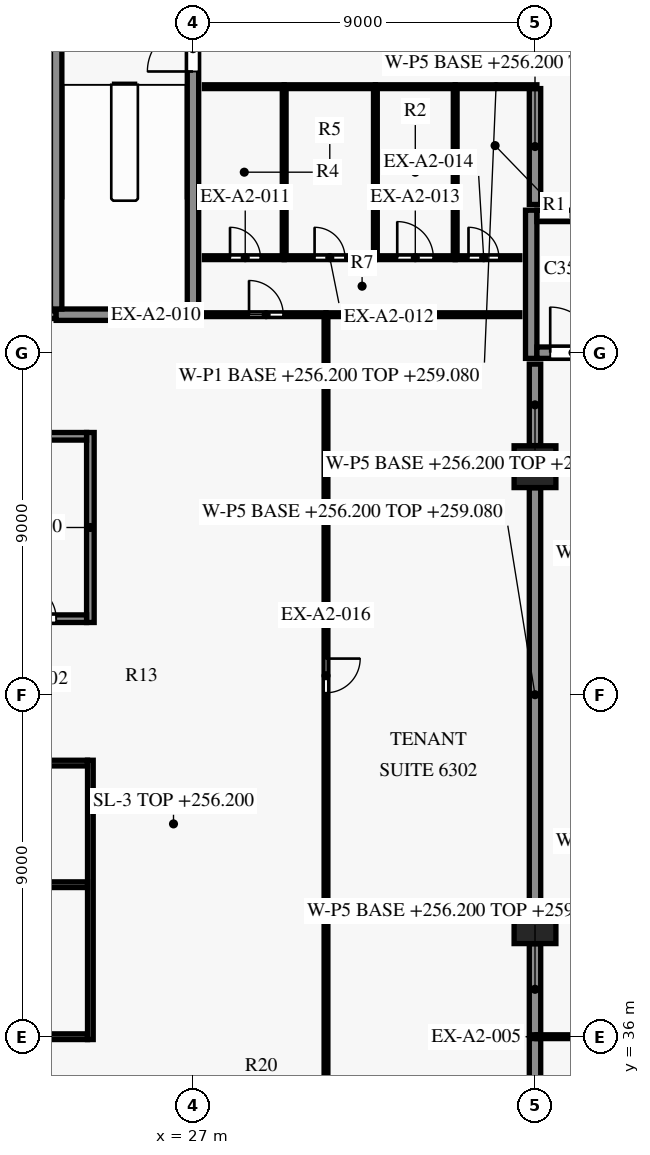
"""IFC4 building model, lengths in metres.
Left out: names, types, materials, properties, quantities, classifications, styles, units other than length and angle.
Written with IfcOpenShell. Run it as: python <this file> out.ifc"""

import sys

from ifc_helpers import new_model, si_unit, direction, frame, frame_2d, origin, origin_2d, place, context, subcontext, project, spatial, rectangle, extrude, element, fill, save


model = new_model("IFC4")
c1 = context("Model", 3, precision=1e-05, world=origin(), true_north=direction((0.0, 1.0)))
c2 = subcontext(c1, "Body", "Model", "MODEL_VIEW")
j1 = project(units=[si_unit("LENGTHUNIT", "METRE"), si_unit("PLANEANGLEUNIT", "RADIAN")], contexts=[c1])
p1 = place(None, origin())
s1 = spatial("IfcSite", under=j1, at=p1, CompositionType="ELEMENT")
p2 = place(p1, origin())
s2 = spatial("IfcBuilding", under=s1, at=p2, CompositionType="ELEMENT")
p3 = place(p2, frame((0.0, 0.0, 256.2)))
s3 = spatial("IfcBuildingStorey", under=s2, at=p3, CompositionType="ELEMENT", Elevation=256.2)
for number, where, z_axis, x_axis in (
    (1, (36.0, 39.0, 0.0), (0.0, 0.0, 1.0), (1.0, 0.0, 0.0)),
    (2, (36.0, 51.0, 0.0), (0.0, 0.0, 1.0), (1.0, 0.0, 0.0)),
):
    element("IfcColumn", number, at=place(p3, frame(where, z_axis=z_axis, x_axis=x_axis)), inside=s3, PredefinedType="COLUMN", context=c2, shape_type="SweptSolid", body=[
        extrude(rectangle(XDim=1.1, YDim=1.1, at=origin_2d()), origin(), (0.0, 0.0, 1.0), 3.8),
    ])
p4 = place(p3, frame((12.4, 36.0, 0.0), z_axis=(0.0, 0.0, 1.0), x_axis=(1.0, 0.0, 0.0)))
e3 = element("IfcWall", 3, at=p4, inside=s3, PredefinedType="SHEAR", context=c2, shape_type="SweptSolid", body=[
    extrude(rectangle(XDim=11.825, YDim=0.15, at=frame_2d((5.913, 0.0))), origin(), (0.0, 0.0, 1.0), 3.5),
])
p5 = place(p4, frame((0.95, 0.0, 0.0)))
e4 = element("IfcOpeningElement", 4, at=p5, cuts=e3, PredefinedType="OPENING", context=c2, shape_type="SweptSolid", body=[
    extrude(rectangle(XDim=0.9, YDim=2.1, at=frame_2d((0.45, 1.05))), frame((0.0, 0.085, 0.0), z_axis=(0.0, -1.0, 0.0), x_axis=(1.0, 0.0, 0.0)), (0.0, 0.0, 1.0), 0.17),
])
p6 = place(p4, frame((3.75, 0.0, 0.0)))
e5 = element("IfcOpeningElement", 5, at=p6, cuts=e3, PredefinedType="OPENING", context=c2, shape_type="SweptSolid", body=[
    extrude(rectangle(XDim=0.9, YDim=2.1, at=frame_2d((0.45, 1.05))), frame((0.0, 0.085, 0.0), z_axis=(0.0, -1.0, 0.0), x_axis=(1.0, 0.0, 0.0)), (0.0, 0.0, 1.0), 0.17),
])
p7 = place(p4, frame((6.325, 0.0, 0.0)))
e6 = element("IfcOpeningElement", 6, at=p7, cuts=e3, PredefinedType="OPENING", context=c2, shape_type="SweptSolid", body=[
    extrude(rectangle(XDim=0.95, YDim=2.1, at=frame_2d((0.475, 1.05))), frame((0.0, 0.085, 0.0), z_axis=(0.0, -1.0, 0.0), x_axis=(1.0, 0.0, 0.0)), (0.0, 0.0, 1.0), 0.17),
])
p8 = place(p4, frame((9.5, 0.0, 0.0)))
e7 = element("IfcOpeningElement", 7, at=p8, cuts=e3, PredefinedType="OPENING", context=c2, shape_type="SweptSolid", body=[
    extrude(rectangle(XDim=0.9, YDim=2.1, at=frame_2d((0.45, 1.05))), frame((0.0, 0.085, 0.0), z_axis=(0.0, -1.0, 0.0), x_axis=(1.0, 0.0, 0.0)), (0.0, 0.0, 1.0), 0.17),
])
p9 = place(p3, frame((8.1, 40.0, 0.0), z_axis=(0.0, 0.0, 1.0), x_axis=(1.0, 0.0, 0.0)))
e8 = element("IfcWall", 8, at=p9, inside=s3, PredefinedType="PARTITIONING", context=c2, shape_type="SweptSolid", body=[
    extrude(rectangle(XDim=16.125, YDim=0.15, at=frame_2d((8.062, 0.0))), origin(), (0.0, 0.0, 1.0), 3.5),
])
p10 = place(p3, frame((8.1, 43.2, 0.0), z_axis=(0.0, 0.0, 1.0), x_axis=(1.0, 0.0, 0.0)))
e9 = element("IfcWall", 9, at=p10, inside=s3, PredefinedType="PARTITIONING", context=c2, shape_type="SweptSolid", body=[
    extrude(rectangle(XDim=16.125, YDim=0.15, at=frame_2d((8.062, 0.0))), origin(), (0.0, 0.0, 1.0), 3.5),
])
p11 = place(p10, frame((1.925, 0.0, 0.0)))
e10 = element("IfcOpeningElement", 10, at=p11, cuts=e9, PredefinedType="OPENING", context=c2, shape_type="SweptSolid", body=[
    extrude(rectangle(XDim=0.9, YDim=2.1, at=frame_2d((0.45, 1.05))), frame((0.0, 0.085, 0.0), z_axis=(0.0, -1.0, 0.0), x_axis=(1.0, 0.0, 0.0)), (0.0, 0.0, 1.0), 0.17),
])
p12 = place(p10, frame((10.025, 0.0, 0.0)))
e11 = element("IfcOpeningElement", 11, at=p12, cuts=e9, PredefinedType="OPENING", context=c2, shape_type="SweptSolid", body=[
    extrude(rectangle(XDim=0.9, YDim=2.1, at=frame_2d((0.45, 1.05))), frame((0.0, 0.085, 0.0), z_axis=(0.0, -1.0, 0.0), x_axis=(1.0, 0.0, 0.0)), (0.0, 0.0, 1.0), 0.17),
])
p13 = place(p3, frame((21.6, 47.0, 0.0), z_axis=(0.0, 0.0, 1.0), x_axis=(1.0, 0.0, 0.0)))
e12 = element("IfcWall", 12, at=p13, inside=s3, PredefinedType="PARTITIONING", context=c2, shape_type="SweptSolid", body=[
    extrude(rectangle(XDim=2.6, YDim=0.2, at=frame_2d((1.3, 0.0))), origin(), (0.0, 0.0, 1.0), 3.5),
])
p14 = place(p13, frame((0.9, 0.0, 0.0)))
e13 = element("IfcOpeningElement", 13, at=p14, cuts=e12, PredefinedType="OPENING", context=c2, shape_type="SweptSolid", body=[
    extrude(rectangle(XDim=0.9, YDim=2.1, at=frame_2d((0.45, 1.05))), frame((0.0, 0.11, 0.0), z_axis=(0.0, -1.0, 0.0), x_axis=(1.0, 0.0, 0.0)), (0.0, 0.0, 1.0), 0.22),
])
p15 = place(p3, frame((21.6, 51.8, 0.0), z_axis=(0.0, 0.0, 1.0), x_axis=(1.0, 0.0, 0.0)))
e14 = element("IfcWall", 14, at=p15, inside=s3, PredefinedType="PARTITIONING", context=c2, shape_type="SweptSolid", body=[
    extrude(rectangle(XDim=2.6, YDim=0.2, at=frame_2d((1.3, 0.0))), origin(), (0.0, 0.0, 1.0), 3.5),
])
p16 = place(p3, frame((36.05, 54.0, 0.0), z_axis=(0.0, 0.0, 1.0), x_axis=(1.0, 0.0, 0.0)))
e15 = element("IfcWall", 15, at=p16, inside=s3, PredefinedType="SHEAR", context=c2, shape_type="SweptSolid", body=[
    extrude(rectangle(XDim=7.7, YDim=0.3, at=frame_2d((3.85, 0.0))), origin(), (0.0, 0.0, 1.0), 3.5),
])
p17 = place(p16, frame((0.35, 0.0, 0.0)))
e16 = element("IfcOpeningElement", 16, at=p17, cuts=e15, PredefinedType="OPENING", context=c2, shape_type="SweptSolid", body=[
    extrude(rectangle(XDim=1.2, YDim=2.2, at=frame_2d((0.6, 1.1))), frame((0.0, 0.16, 0.0), z_axis=(0.0, -1.0, 0.0), x_axis=(1.0, 0.0, 0.0)), (0.0, 0.0, 1.0), 0.32),
])
p18 = place(p3, frame((16.15, 55.0, 0.0), z_axis=(0.0, 0.0, 1.0), x_axis=(1.0, 0.0, 0.0)))
e17 = element("IfcWall", 17, at=p18, inside=s3, PredefinedType="PARTITIONING", context=c2, shape_type="SweptSolid", body=[
    extrude(rectangle(XDim=7.25, YDim=0.2, at=frame_2d((3.625, 0.0))), origin(), (0.0, 0.0, 1.0), 3.5),
])
p19 = place(p18, frame((3.125, 0.0, 0.0)))
e18 = element("IfcOpeningElement", 18, at=p19, cuts=e17, PredefinedType="OPENING", context=c2, shape_type="SweptSolid", body=[
    extrude(rectangle(XDim=1.0, YDim=2.1, at=frame_2d((0.5, 1.05))), frame((0.0, 0.11, 0.0), z_axis=(0.0, -1.0, 0.0), x_axis=(1.0, 0.0, 0.0)), (0.0, 0.0, 1.0), 0.22),
])
p20 = place(p3, frame((23.4, 55.0, 0.0), z_axis=(0.0, 0.0, 1.0), x_axis=(1.0, 0.0, 0.0)))
e19 = element("IfcWall", 19, at=p20, inside=s3, PredefinedType="SHEAR", context=c2, shape_type="SweptSolid", body=[
    extrude(rectangle(XDim=3.45, YDim=0.3, at=frame_2d((1.725, 0.0))), origin(), (0.0, 0.0, 1.0), 3.5),
])
p21 = place(p3, frame((36.05, 57.6, 0.0), z_axis=(0.0, 0.0, 1.0), x_axis=(1.0, 0.0, 0.0)))
e20 = element("IfcWall", 20, at=p21, inside=s3, PredefinedType="SHEAR", context=c2, shape_type="SweptSolid", body=[
    extrude(rectangle(XDim=7.7, YDim=0.3, at=frame_2d((3.85, 0.0))), origin(), (0.0, 0.0, 1.0), 3.5),
])
p22 = place(p3, frame((23.4, 55.15, 0.0), z_axis=(0.0, 0.0, 1.0), x_axis=(0.0, 1.0, 0.0)))
e21 = element("IfcWall", 21, at=p22, inside=s3, PredefinedType="SHEAR", context=c2, shape_type="SweptSolid", body=[
    extrude(rectangle(XDim=8.0, YDim=0.3, at=frame_2d((4.0, 0.0))), origin(), (0.0, 0.0, 1.0), 3.5),
])
p23 = place(p3, frame((24.3, 35.925, 0.0), z_axis=(0.0, 0.0, 1.0), x_axis=(0.0, 1.0, 0.0)))
e22 = element("IfcWall", 22, at=p23, inside=s3, PredefinedType="PARTITIONING", context=c2, shape_type="SweptSolid", body=[
    extrude(rectangle(XDim=7.35, YDim=0.15, at=frame_2d((3.675, 0.0))), origin(), (0.0, 0.0, 1.0), 3.5),
])
p24 = place(p3, frame((24.3, 46.9, 0.0), z_axis=(0.0, 0.0, 1.0), x_axis=(0.0, 1.0, 0.0)))
e23 = element("IfcWall", 23, at=p24, inside=s3, PredefinedType="SHEAR", context=c2, shape_type="SweptSolid", body=[
    extrude(rectangle(XDim=5.0, YDim=0.2, at=frame_2d((2.5, 0.0))), origin(), (0.0, 0.0, 1.0), 3.5),
])
p25 = place(p3, frame((27.0, 54.85, 0.0), z_axis=(0.0, 0.0, 1.0), x_axis=(0.0, 1.0, 0.0)))
e24 = element("IfcWall", 24, at=p25, inside=s3, PredefinedType="SHEAR", context=c2, shape_type="SweptSolid", body=[
    extrude(rectangle(XDim=8.6, YDim=0.3, at=frame_2d((4.3, 0.0))), origin(), (0.0, 0.0, 1.0), 3.5),
])
p26 = place(p25, frame((6.55, 0.0, 0.0)))
e25 = element("IfcOpeningElement", 25, at=p26, cuts=e24, PredefinedType="OPENING", context=c2, shape_type="SweptSolid", body=[
    extrude(rectangle(XDim=1.2, YDim=2.2, at=frame_2d((0.6, 1.1))), frame((0.0, 0.16, 0.0), z_axis=(0.0, -1.0, 0.0), x_axis=(1.0, 0.0, 0.0)), (0.0, 0.0, 1.0), 0.32),
])
p27 = place(p3, frame((35.9, 53.85, 0.0), z_axis=(0.0, 0.0, 1.0), x_axis=(0.0, 1.0, 0.0)))
e26 = element("IfcWall", 26, at=p27, inside=s3, PredefinedType="SHEAR", context=c2, shape_type="SweptSolid", body=[
    extrude(rectangle(XDim=3.9, YDim=0.3, at=frame_2d((1.95, 0.0))), origin(), (0.0, 0.0, 1.0), 3.5),
])
p28 = place(p3, frame((36.0, 27.774, 0.0), z_axis=(0.0, 0.0, 1.0), x_axis=(0.0, 1.0, 0.0)))
e27 = element("IfcWall", 27, at=p28, inside=s3, PredefinedType="PARTITIONING", context=c2, shape_type="SweptSolid", body=[
    extrude(rectangle(XDim=8.176, YDim=0.3, at=frame_2d((4.088, 0.0))), origin(), (0.0, 0.0, 1.0), 2.88),
])
p29 = place(p3, frame((40.5, 36.0, 0.0), z_axis=(0.0, 0.0, 1.0), x_axis=(-1.0, 0.0, 0.0)))
e28 = element("IfcWall", 28, at=p29, inside=s3, PredefinedType="PARTITIONING", context=c2, shape_type="SweptSolid", body=[
    extrude(rectangle(XDim=4.45, YDim=0.1, at=frame_2d((2.225, 0.0))), origin(), (0.0, 0.0, 1.0), 2.88),
])
p30 = place(p29, frame((1.35, 0.0, 0.0)))
e29 = element("IfcOpeningElement", 29, at=p30, cuts=e28, PredefinedType="OPENING", context=c2, shape_type="SweptSolid", body=[
    extrude(rectangle(XDim=1.8, YDim=2.1, at=frame_2d((0.9, 1.05))), frame((0.0, 0.06, 0.0), z_axis=(0.0, -1.0, 0.0), x_axis=(1.0, 0.0, 0.0)), (0.0, 0.0, 1.0), 0.12),
])
p31 = place(p3, frame((36.0, 36.05, 0.0), z_axis=(0.0, 0.0, 1.0), x_axis=(0.0, 1.0, 0.0)))
e30 = element("IfcWall", 30, at=p31, inside=s3, PredefinedType="PARTITIONING", context=c2, shape_type="SweptSolid", body=[
    extrude(rectangle(XDim=2.395, YDim=0.3, at=frame_2d((1.198, 0.0))), origin(), (0.0, 0.0, 1.0), 2.88),
])
p32 = place(p3, frame((36.0, 39.555, 0.0), z_axis=(0.0, 0.0, 1.0), x_axis=(0.0, 1.0, 0.0)))
e31 = element("IfcWall", 31, at=p32, inside=s3, PredefinedType="PARTITIONING", context=c2, shape_type="SweptSolid", body=[
    extrude(rectangle(XDim=10.89, YDim=0.3, at=frame_2d((5.445, 0.0))), origin(), (0.0, 0.0, 1.0), 2.88),
])
p33 = place(p3, frame((36.0, 51.555, 0.0), z_axis=(0.0, 0.0, 1.0), x_axis=(0.0, 1.0, 0.0)))
e32 = element("IfcWall", 32, at=p33, inside=s3, PredefinedType="PARTITIONING", context=c2, shape_type="SweptSolid", body=[
    extrude(rectangle(XDim=2.145, YDim=0.3, at=frame_2d((1.073, 0.0))), origin(), (0.0, 0.0, 1.0), 2.88),
])
p34 = place(p3, frame((30.5, 54.95, 0.0), z_axis=(0.0, 0.0, 1.0), x_axis=(0.0, -1.0, 0.0)))
e33 = element("IfcWall", 33, at=p34, inside=s3, PredefinedType="PARTITIONING", context=c2, shape_type="SweptSolid", body=[
    extrude(rectangle(XDim=21.4, YDim=0.1, at=frame_2d((10.7, 0.0))), origin(), (0.0, 0.0, 1.0), 3.48),
])
p35 = place(p34, frame((9.0, 0.0, 0.0)))
e34 = element("IfcOpeningElement", 34, at=p35, cuts=e33, PredefinedType="OPENING", context=c2, shape_type="SweptSolid", body=[
    extrude(rectangle(XDim=0.9, YDim=2.1, at=frame_2d((0.45, 1.05))), frame((0.0, 0.06, 0.0), z_axis=(0.0, -1.0, 0.0), x_axis=(1.0, 0.0, 0.0)), (0.0, 0.0, 1.0), 0.12),
])
p36 = place(p3, frame((27.3, 55.0, 0.0), z_axis=(0.0, 0.0, 1.0), x_axis=(1.0, 0.0, 0.0)))
e35 = element("IfcWall", 35, at=p36, inside=s3, PredefinedType="PARTITIONING", context=c2, shape_type="SweptSolid", body=[
    extrude(rectangle(XDim=3.2, YDim=0.1, at=frame_2d((1.6, 0.0))), origin(), (0.0, 0.0, 1.0), 3.48),
])
p37 = place(p36, frame((1.175, 0.0, 0.0)))
e36 = element("IfcOpeningElement", 36, at=p37, cuts=e35, PredefinedType="OPENING", context=c2, shape_type="SweptSolid", body=[
    extrude(rectangle(XDim=0.9, YDim=2.1, at=frame_2d((0.45, 1.05))), frame((0.0, 0.06, 0.0), z_axis=(0.0, -1.0, 0.0), x_axis=(1.0, 0.0, 0.0)), (0.0, 0.0, 1.0), 0.12),
])
p38 = place(p3, frame((35.6, 55.0, 0.0), z_axis=(0.0, 0.0, 1.0), x_axis=(-1.0, 0.0, 0.0)))
e37 = element("IfcWall", 37, at=p38, inside=s3, PredefinedType="PARTITIONING", context=c2, shape_type="SweptSolid", body=[
    extrude(rectangle(XDim=5.1, YDim=0.1, at=frame_2d((2.55, 0.0))), origin(), (0.0, 0.0, 1.0), 3.48),
])
p39 = place(p3, frame((27.3, 56.5, 0.0), z_axis=(0.0, 0.0, 1.0), x_axis=(1.0, 0.0, 0.0)))
e38 = element("IfcWall", 38, at=p39, inside=s3, PredefinedType="PARTITIONING", context=c2, shape_type="SweptSolid", body=[
    extrude(rectangle(XDim=2.1, YDim=0.1, at=frame_2d((1.05, 0.0))), origin(), (0.0, 0.0, 1.0), 3.48),
])
p40 = place(p39, frame((0.675, 0.0, 0.0)))
e39 = element("IfcOpeningElement", 39, at=p40, cuts=e38, PredefinedType="OPENING", context=c2, shape_type="SweptSolid", body=[
    extrude(rectangle(XDim=0.8, YDim=2.1, at=frame_2d((0.4, 1.05))), frame((0.0, 0.06, 0.0), z_axis=(0.0, -1.0, 0.0), x_axis=(1.0, 0.0, 0.0)), (0.0, 0.0, 1.0), 0.12),
])
p41 = place(p3, frame((29.4, 56.5, 0.0), z_axis=(0.0, 0.0, 1.0), x_axis=(1.0, 0.0, 0.0)))
e40 = element("IfcWall", 40, at=p41, inside=s3, PredefinedType="PARTITIONING", context=c2, shape_type="SweptSolid", body=[
    extrude(rectangle(XDim=2.4, YDim=0.1, at=frame_2d((1.2, 0.0))), origin(), (0.0, 0.0, 1.0), 3.48),
])
p42 = place(p41, frame((0.8, 0.0, 0.0)))
e41 = element("IfcOpeningElement", 41, at=p42, cuts=e40, PredefinedType="OPENING", context=c2, shape_type="SweptSolid", body=[
    extrude(rectangle(XDim=0.8, YDim=2.1, at=frame_2d((0.4, 1.05))), frame((0.0, 0.06, 0.0), z_axis=(0.0, -1.0, 0.0), x_axis=(1.0, 0.0, 0.0)), (0.0, 0.0, 1.0), 0.12),
])
p43 = place(p3, frame((31.8, 56.5, 0.0), z_axis=(0.0, 0.0, 1.0), x_axis=(1.0, 0.0, 0.0)))
e42 = element("IfcWall", 42, at=p43, inside=s3, PredefinedType="PARTITIONING", context=c2, shape_type="SweptSolid", body=[
    extrude(rectangle(XDim=2.1, YDim=0.1, at=frame_2d((1.05, 0.0))), origin(), (0.0, 0.0, 1.0), 3.48),
])
p44 = place(p43, frame((0.575, 0.0, 0.0)))
e43 = element("IfcOpeningElement", 43, at=p44, cuts=e42, PredefinedType="OPENING", context=c2, shape_type="SweptSolid", body=[
    extrude(rectangle(XDim=0.95, YDim=2.1, at=frame_2d((0.475, 1.05))), frame((0.0, 0.06, 0.0), z_axis=(0.0, -1.0, 0.0), x_axis=(1.0, 0.0, 0.0)), (0.0, 0.0, 1.0), 0.12),
])
p45 = place(p3, frame((33.9, 56.5, 0.0), z_axis=(0.0, 0.0, 1.0), x_axis=(1.0, 0.0, 0.0)))
e44 = element("IfcWall", 44, at=p45, inside=s3, PredefinedType="PARTITIONING", context=c2, shape_type="SweptSolid", body=[
    extrude(rectangle(XDim=1.7, YDim=0.1, at=frame_2d((0.85, 0.0))), origin(), (0.0, 0.0, 1.0), 3.48),
])
p46 = place(p45, frame((0.35, 0.0, 0.0)))
e45 = element("IfcOpeningElement", 45, at=p46, cuts=e44, PredefinedType="OPENING", context=c2, shape_type="SweptSolid", body=[
    extrude(rectangle(XDim=0.8, YDim=2.1, at=frame_2d((0.4, 1.05))), frame((0.0, 0.06, 0.0), z_axis=(0.0, -1.0, 0.0), x_axis=(1.0, 0.0, 0.0)), (0.0, 0.0, 1.0), 0.12),
])
for number, where, z_axis, x_axis in (
    (46, (29.4, 60.95, 0.0), (0.0, 0.0, 1.0), (0.0, -1.0, 0.0)),
    (47, (31.8, 60.95, 0.0), (0.0, 0.0, 1.0), (0.0, -1.0, 0.0)),
    (48, (33.9, 60.95, 0.0), (0.0, 0.0, 1.0), (0.0, -1.0, 0.0)),
):
    element("IfcWall", number, at=place(p3, frame(where, z_axis=z_axis, x_axis=x_axis)), inside=s3, PredefinedType="PARTITIONING", context=c2, shape_type="SweptSolid", body=[
        extrude(rectangle(XDim=4.4, YDim=0.1, at=frame_2d((2.2, 0.0))), origin(), (0.0, 0.0, 1.0), 3.48),
    ])
p47 = place(p3, frame((36.0, 60.95, 0.0), z_axis=(0.0, 0.0, 1.0), x_axis=(0.0, -1.0, 0.0)))
e49 = element("IfcWall", 49, at=p47, inside=s3, PredefinedType="PARTITIONING", context=c2, shape_type="SweptSolid", body=[
    extrude(rectangle(XDim=3.05, YDim=0.3, at=frame_2d((1.525, 0.0))), origin(), (0.0, 0.0, 1.0), 2.88),
])
p48 = place(p3, frame((27.3, 61.0, 0.0), z_axis=(0.0, 0.0, 1.0), x_axis=(1.0, 0.0, 0.0)))
e50 = element("IfcWall", 50, at=p48, inside=s3, PredefinedType="PARTITIONING", context=c2, shape_type="SweptSolid", body=[
    extrude(rectangle(XDim=2.1, YDim=0.1, at=frame_2d((1.05, 0.0))), origin(), (0.0, 0.0, 1.0), 3.48),
])
p49 = place(p3, frame((29.4, 61.0, 0.0), z_axis=(0.0, 0.0, 1.0), x_axis=(1.0, 0.0, 0.0)))
e51 = element("IfcWall", 51, at=p49, inside=s3, PredefinedType="PARTITIONING", context=c2, shape_type="SweptSolid", body=[
    extrude(rectangle(XDim=2.4, YDim=0.1, at=frame_2d((1.2, 0.0))), origin(), (0.0, 0.0, 1.0), 3.48),
])
p50 = place(p3, frame((31.8, 61.0, 0.0), z_axis=(0.0, 0.0, 1.0), x_axis=(1.0, 0.0, 0.0)))
e52 = element("IfcWall", 52, at=p50, inside=s3, PredefinedType="PARTITIONING", context=c2, shape_type="SweptSolid", body=[
    extrude(rectangle(XDim=2.1, YDim=0.1, at=frame_2d((1.05, 0.0))), origin(), (0.0, 0.0, 1.0), 3.48),
])
p51 = place(p3, frame((33.9, 61.0, 0.0), z_axis=(0.0, 0.0, 1.0), x_axis=(1.0, 0.0, 0.0)))
e53 = element("IfcWall", 53, at=p51, inside=s3, PredefinedType="PARTITIONING", context=c2, shape_type="SweptSolid", body=[
    extrude(rectangle(XDim=2.15, YDim=0.1, at=frame_2d((1.075, 0.0))), origin(), (0.0, 0.0, 1.0), 2.88),
])
p52 = place(p14, origin())
e54 = element("IfcDoor", 54, at=p52, inside=s3, OperationType="SINGLE_SWING_LEFT", PredefinedType="DOOR", context=c2, shape_type="SweptSolid", body=[
    extrude(rectangle(XDim=0.9, YDim=2.1, at=frame_2d((0.45, 1.05))), frame((0.0, 0.025, 0.0), z_axis=(0.0, -1.0, 0.0), x_axis=(1.0, 0.0, 0.0)), (0.0, 0.0, 1.0), 0.05),
])
fill(e13, e54)
p53 = place(p26, origin())
e55 = element("IfcDoor", 55, at=p53, inside=s3, OperationType="SINGLE_SWING_LEFT", PredefinedType="DOOR", context=c2, shape_type="SweptSolid", body=[
    extrude(rectangle(XDim=1.2, YDim=2.2, at=frame_2d((0.6, 1.1))), frame((0.0, 0.025, 0.0), z_axis=(0.0, -1.0, 0.0), x_axis=(1.0, 0.0, 0.0)), (0.0, 0.0, 1.0), 0.05),
])
fill(e25, e55)
p54 = place(p17, origin())
e56 = element("IfcDoor", 56, at=p54, inside=s3, OperationType="SINGLE_SWING_LEFT", PredefinedType="DOOR", context=c2, shape_type="SweptSolid", body=[
    extrude(rectangle(XDim=1.2, YDim=2.2, at=frame_2d((0.6, 1.1))), frame((0.0, 0.025, 0.0), z_axis=(0.0, -1.0, 0.0), x_axis=(1.0, 0.0, 0.0)), (0.0, 0.0, 1.0), 0.05),
])
fill(e16, e56)
p55 = place(p37, origin())
e57 = element("IfcDoor", 57, at=p55, inside=s3, OperationType="SINGLE_SWING_RIGHT", PredefinedType="DOOR", context=c2, shape_type="SweptSolid", body=[
    extrude(rectangle(XDim=0.9, YDim=2.1, at=frame_2d((0.45, 1.05))), frame((0.0, 0.025, 0.0), z_axis=(0.0, -1.0, 0.0), x_axis=(1.0, 0.0, 0.0)), (0.0, 0.0, 1.0), 0.05),
])
fill(e36, e57)
p56 = place(p40, origin())
e58 = element("IfcDoor", 58, at=p56, inside=s3, OperationType="SINGLE_SWING_LEFT", PredefinedType="DOOR", context=c2, shape_type="SweptSolid", body=[
    extrude(rectangle(XDim=0.8, YDim=2.1, at=frame_2d((0.4, 1.05))), frame((0.0, 0.025, 0.0), z_axis=(0.0, -1.0, 0.0), x_axis=(1.0, 0.0, 0.0)), (0.0, 0.0, 1.0), 0.05),
])
fill(e39, e58)
p57 = place(p42, origin())
e59 = element("IfcDoor", 59, at=p57, inside=s3, OperationType="SINGLE_SWING_RIGHT", PredefinedType="DOOR", context=c2, shape_type="SweptSolid", body=[
    extrude(rectangle(XDim=0.8, YDim=2.1, at=frame_2d((0.4, 1.05))), frame((0.0, 0.025, 0.0), z_axis=(0.0, -1.0, 0.0), x_axis=(1.0, 0.0, 0.0)), (0.0, 0.0, 1.0), 0.05),
])
fill(e41, e59)
p58 = place(p44, origin())
e60 = element("IfcDoor", 60, at=p58, inside=s3, OperationType="SINGLE_SWING_LEFT", PredefinedType="DOOR", context=c2, shape_type="SweptSolid", body=[
    extrude(rectangle(XDim=0.95, YDim=2.1, at=frame_2d((0.475, 1.05))), frame((0.0, 0.025, 0.0), z_axis=(0.0, -1.0, 0.0), x_axis=(1.0, 0.0, 0.0)), (0.0, 0.0, 1.0), 0.05),
])
fill(e43, e60)
p59 = place(p46, origin())
e61 = element("IfcDoor", 61, at=p59, inside=s3, OperationType="SINGLE_SWING_LEFT", PredefinedType="DOOR", context=c2, shape_type="SweptSolid", body=[
    extrude(rectangle(XDim=0.8, YDim=2.1, at=frame_2d((0.4, 1.05))), frame((0.0, 0.025, 0.0), z_axis=(0.0, -1.0, 0.0), x_axis=(1.0, 0.0, 0.0)), (0.0, 0.0, 1.0), 0.05),
])
fill(e45, e61)
p60 = place(p35, origin())
e62 = element("IfcDoor", 62, at=p60, inside=s3, OperationType="SINGLE_SWING_LEFT", PredefinedType="DOOR", context=c2, shape_type="SweptSolid", body=[
    extrude(rectangle(XDim=0.9, YDim=2.1, at=frame_2d((0.45, 1.05))), frame((0.0, 0.025, 0.0), z_axis=(0.0, -1.0, 0.0), x_axis=(1.0, 0.0, 0.0)), (0.0, 0.0, 1.0), 0.05),
])
fill(e34, e62)
save(model, sys.argv[1])
